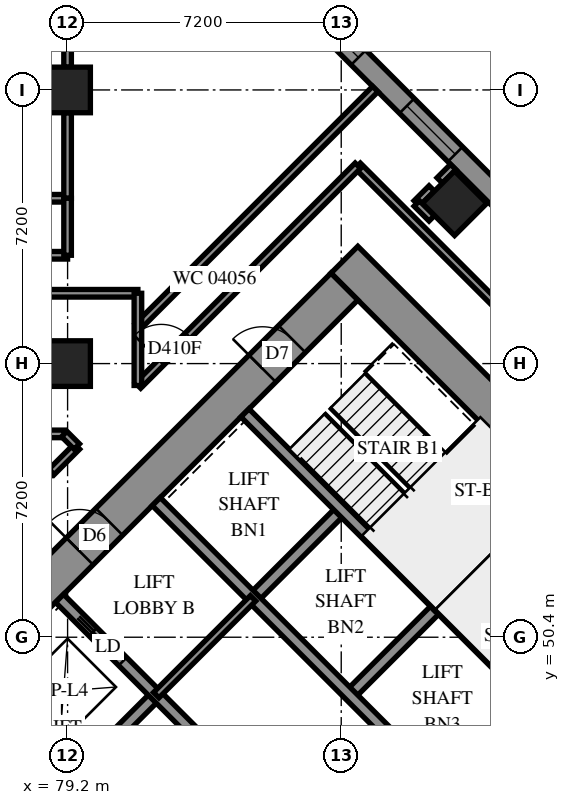
"""IFC4 building model, lengths in metres.
Left out: names, types, materials, properties, quantities, classifications, styles, units other than length and angle.
Written with IfcOpenShell. Run it as: python <this file> out.ifc"""

import sys

from ifc_helpers import new_model, si_unit, direction, frame, frame_2d, origin, origin_2d, place, context, subcontext, project, spatial, polyline, rectangle, outline, extrude, element, fill, save


model = new_model("IFC4")
c1 = context("Model", 3, precision=1e-05, world=origin(), true_north=direction((0.0, 1.0)))
c2 = subcontext(c1, "Body", "Model", "MODEL_VIEW")
j1 = project(units=[si_unit("LENGTHUNIT", "METRE"), si_unit("PLANEANGLEUNIT", "RADIAN")], contexts=[c1])
p1 = place(None, origin())
s1 = spatial("IfcSite", under=j1, at=p1, CompositionType="ELEMENT")
p2 = place(p1, origin())
s2 = spatial("IfcBuilding", under=s1, at=p2, CompositionType="ELEMENT")
p3 = place(p2, frame((0.0, 0.0, 18.6)))
s3 = spatial("IfcBuildingStorey", under=s2, at=p3, CompositionType="ELEMENT", Elevation=18.6)
for number, where, z_axis, x_axis in (
    (1, (79.2, 57.6, 0.0), (0.0, 0.0, 1.0), (1.0, 0.0, 0.0)),
    (2, (79.2, 64.8, 0.0), (0.0, 0.0, 1.0), (1.0, 0.0, 0.0)),
    (3, (89.382, 61.818, 0.0), (0.0, 0.0, 1.0), (0.707, -0.707, 0.0)),
):
    element("IfcColumn", number, at=place(p3, frame(where, z_axis=z_axis, x_axis=x_axis)), inside=s3, PredefinedType="COLUMN", context=c2, shape_type="SweptSolid", body=[
        extrude(rectangle(XDim=1.2, YDim=1.2, at=origin_2d()), origin(), (0.0, 0.0, 1.0), 3.8),
    ])
p4 = place(p3, frame((75.594, 49.443, -0.4), z_axis=(0.0, 0.0, 1.0), x_axis=(0.7071037324, -0.70710983, 0.0)))
e4 = element("IfcWall", 4, at=p4, inside=s3, PredefinedType="SHEAR", context=c2, shape_type="SweptSolid", body=[
    extrude(rectangle(XDim=16.4, YDim=1.0, at=frame_2d((8.2, 0.0))), origin(), (0.0, 0.0, 1.0), 3.5),
])
p5 = place(p3, frame((86.483, 60.333, -0.4), z_axis=(0.0, 0.0, 1.0), x_axis=(0.70710983, -0.7071037324, 0.0)))
e5 = element("IfcWall", 5, at=p5, inside=s3, PredefinedType="SHEAR", context=c2, shape_type="SweptSolid", body=[
    extrude(rectangle(XDim=16.4, YDim=1.0, at=frame_2d((8.2, 0.0))), origin(), (0.0, 0.0, 1.0), 3.5),
])
p6 = place(p5, frame((11.0, 0.0, 0.4)))
e6 = element("IfcOpeningElement", 6, at=p6, cuts=e5, PredefinedType="OPENING", context=c2, shape_type="SweptSolid", body=[
    extrude(rectangle(XDim=0.8, YDim=2.1, at=frame_2d((0.4, 1.05))), frame((0.0, 0.51, 0.0), z_axis=(0.0, -1.0, 0.0), x_axis=(1.0, 0.0, 0.0)), (0.0, 0.0, 1.0), 1.02),
])
p7 = place(p3, frame((76.301, 49.443, -0.4), z_axis=(0.0, 0.0, 1.0), x_axis=(0.7071067812, 0.7071067812, 0.0)))
e7 = element("IfcWall", 7, at=p7, inside=s3, PredefinedType="SHEAR", context=c2, shape_type="SweptSolid", body=[
    extrude(rectangle(XDim=14.4, YDim=1.0, at=frame_2d((7.2, 0.0))), origin(), (0.0, 0.0, 1.0), 3.5),
])
p8 = place(p7, frame((4.55, 0.0, 0.4)))
e8 = element("IfcOpeningElement", 8, at=p8, cuts=e7, PredefinedType="OPENING", context=c2, shape_type="SweptSolid", body=[
    extrude(rectangle(XDim=1.1, YDim=2.1, at=frame_2d((0.55, 1.05))), frame((0.0, 0.51, 0.0), z_axis=(0.0, -1.0, 0.0), x_axis=(1.0, 0.0, 0.0)), (0.0, 0.0, 1.0), 1.02),
])
p9 = place(p7, frame((11.35, 0.0, 0.4)))
e9 = element("IfcOpeningElement", 9, at=p9, cuts=e7, PredefinedType="OPENING", context=c2, shape_type="SweptSolid", body=[
    extrude(rectangle(XDim=1.1, YDim=2.1, at=frame_2d((0.55, 1.05))), frame((0.0, 0.51, 0.0), z_axis=(0.0, -1.0, 0.0), x_axis=(1.0, 0.0, 0.0)), (0.0, 0.0, 1.0), 1.02),
])
p10 = place(p3, frame((87.19, 38.554, -0.4), z_axis=(0.0, 0.0, 1.0), x_axis=(0.707103309, 0.7071102534, 0.0)))
e10 = element("IfcWall", 10, at=p10, inside=s3, PredefinedType="SHEAR", context=c2, shape_type="SweptSolid", body=[
    extrude(rectangle(XDim=14.4, YDim=1.0, at=frame_2d((7.2, 0.0))), origin(), (0.0, 0.0, 1.0), 3.5),
])
p11 = place(p10, frame((4.55, 0.0, 0.4)))
e11 = element("IfcOpeningElement", 11, at=p11, cuts=e10, PredefinedType="OPENING", context=c2, shape_type="SweptSolid", body=[
    extrude(rectangle(XDim=1.1, YDim=2.1, at=frame_2d((0.55, 1.05))), frame((0.0, 0.51, 0.0), z_axis=(0.0, -1.0, 0.0), x_axis=(1.0, 0.0, 0.0)), (0.0, 0.0, 1.0), 1.02),
])
p12 = place(p10, frame((11.35, 0.0, 0.4)))
e12 = element("IfcOpeningElement", 12, at=p12, cuts=e10, PredefinedType="OPENING", context=c2, shape_type="SweptSolid", body=[
    extrude(rectangle(XDim=1.1, YDim=2.1, at=frame_2d((0.55, 1.05))), frame((0.0, 0.51, 0.0), z_axis=(0.0, -1.0, 0.0), x_axis=(1.0, 0.0, 0.0)), (0.0, 0.0, 1.0), 1.02),
])
for number, where, z_axis, x_axis in (
    (13, (79.2, 46.544, 0.0), (0.0, 0.0, 1.0), (0.707, 0.707, 0.0)),
    (14, (84.079, 51.423, 0.0), (0.0, 0.0, 1.0), (0.707, 0.707, 0.0)),
):
    element("IfcWall", number, at=place(p3, frame(where, z_axis=z_axis, x_axis=x_axis)), inside=s3, PredefinedType="SOLIDWALL", context=c2, shape_type="SweptSolid", body=[
        extrude(rectangle(XDim=3.3, YDim=0.3, at=frame_2d((1.65, 0.0))), origin(), (0.0, 0.0, 1.0), 3.8),
    ])
for number, where, z_axis, x_axis in (
    (15, (86.625, 48.878, 0.0), (0.0, 0.0, 1.0), (0.707, 0.707, 0.0)),
    (16, (89.17, 46.332, 0.0), (0.0, 0.0, 1.0), (0.707, 0.707, 0.0)),
):
    element("IfcWall", number, at=place(p3, frame(where, z_axis=z_axis, x_axis=x_axis)), inside=s3, PredefinedType="SOLIDWALL", context=c2, shape_type="SweptSolid", body=[
        extrude(rectangle(XDim=3.3, YDim=0.3, at=frame_2d((1.65, 0.0))), origin(), (0.0, 0.0, 1.0), 3.8),
    ])
p13 = place(p3, frame((78.988, 51.423, 0.0), z_axis=(0.0, 0.0, 1.0), x_axis=(0.7071067812, -0.7071067812, 0.0)))
e17 = element("IfcWall", 17, at=p13, inside=s3, PredefinedType="SOLIDWALL", context=c2, shape_type="SweptSolid", body=[
    extrude(rectangle(XDim=14.4, YDim=0.3, at=frame_2d((7.2, 0.0))), origin(), (0.0, 0.0, 1.0), 3.8),
])
p14 = place(p13, frame((1.25, 0.0, 0.0)))
e18 = element("IfcOpeningElement", 18, at=p14, cuts=e17, PredefinedType="OPENING", context=c2, shape_type="SweptSolid", body=[
    extrude(rectangle(XDim=1.1, YDim=2.1, at=frame_2d((0.55, 1.05))), frame((0.0, 0.16, 0.0), z_axis=(0.0, -1.0, 0.0), x_axis=(1.0, 0.0, 0.0)), (0.0, 0.0, 1.0), 0.32),
])
p15 = place(p13, frame((4.85, 0.0, 0.0)))
e19 = element("IfcOpeningElement", 19, at=p15, cuts=e17, PredefinedType="OPENING", context=c2, shape_type="SweptSolid", body=[
    extrude(rectangle(XDim=1.1, YDim=2.1, at=frame_2d((0.55, 1.05))), frame((0.0, 0.16, 0.0), z_axis=(0.0, -1.0, 0.0), x_axis=(1.0, 0.0, 0.0)), (0.0, 0.0, 1.0), 0.32),
])
p16 = place(p13, frame((8.45, 0.0, 0.0)))
e20 = element("IfcOpeningElement", 20, at=p16, cuts=e17, PredefinedType="OPENING", context=c2, shape_type="SweptSolid", body=[
    extrude(rectangle(XDim=1.1, YDim=2.1, at=frame_2d((0.55, 1.05))), frame((0.0, 0.16, 0.0), z_axis=(0.0, -1.0, 0.0), x_axis=(1.0, 0.0, 0.0)), (0.0, 0.0, 1.0), 0.32),
])
p17 = place(p13, frame((12.05, 0.0, 0.0)))
e21 = element("IfcOpeningElement", 21, at=p17, cuts=e17, PredefinedType="OPENING", context=c2, shape_type="SweptSolid", body=[
    extrude(rectangle(XDim=1.1, YDim=2.1, at=frame_2d((0.55, 1.05))), frame((0.0, 0.16, 0.0), z_axis=(0.0, -1.0, 0.0), x_axis=(1.0, 0.0, 0.0)), (0.0, 0.0, 1.0), 0.32),
])
p18 = place(p3, frame((81.534, 53.969, 0.0), z_axis=(0.0, 0.0, 1.0), x_axis=(0.707103309, -0.7071102534, 0.0)))
e22 = element("IfcWall", 22, at=p18, inside=s3, PredefinedType="SOLIDWALL", context=c2, shape_type="SweptSolid", body=[
    extrude(rectangle(XDim=14.4, YDim=0.3, at=frame_2d((7.2, 0.0))), origin(), (0.0, 0.0, 1.0), 3.8),
])
p19 = place(p18, frame((12.05, 0.0, 0.0)))
e23 = element("IfcOpeningElement", 23, at=p19, cuts=e22, PredefinedType="OPENING", context=c2, shape_type="SweptSolid", body=[
    extrude(rectangle(XDim=1.1, YDim=2.1, at=frame_2d((0.55, 1.05))), frame((0.0, 0.16, 0.0), z_axis=(0.0, -1.0, 0.0), x_axis=(1.0, 0.0, 0.0)), (0.0, 0.0, 1.0), 0.32),
])
for number, where, z_axis, x_axis in (
    (24, (83.867, 56.302, 0.0), (0.0, 0.0, 1.0), (0.707, -0.707, 0.0)),
    (25, (88.958, 51.211, 0.0), (0.0, 0.0, 1.0), (0.707, -0.707, 0.0)),
):
    element("IfcWall", number, at=place(p3, frame(where, z_axis=z_axis, x_axis=x_axis)), inside=s3, PredefinedType="SOLIDWALL", context=c2, shape_type="SweptSolid", body=[
        extrude(rectangle(XDim=7.2, YDim=0.3, at=frame_2d((3.6, 0.0))), origin(), (0.0, 0.0, 1.0), 3.8),
    ])
p20 = place(p3, frame((88.958, 51.211, 0.0), z_axis=(0.0, 0.0, 1.0), x_axis=(0.7071067812, 0.7071067812, 0.0)))
e26 = element("IfcWall", 26, at=p20, inside=s3, PredefinedType="SOLIDWALL", context=c2, shape_type="SweptSolid", body=[
    extrude(rectangle(XDim=4.2, YDim=0.3, at=frame_2d((2.1, 0.0))), origin(), (0.0, 0.0, 1.0), 3.8),
])
p21 = place(p3, frame((117.843, 34.665, 0.0), z_axis=(0.0, 0.0, 1.0), x_axis=(-0.7071067812, 0.7071067812, 0.0)))
e27 = element("IfcWall", 27, at=p21, inside=s3, PredefinedType="SOLIDWALL", context=c2, shape_type="SweptSolid", body=[
    extrude(outline(polyline([(-0.275, -0.275), (54.222, -0.275), (53.994, 0.275), (0.275, 0.275), (-0.275, -0.275)])), origin(), (0.0, 0.0, 1.0), 3.8),
])
p22 = place(p21, frame((0.8, 0.0, 0.7)))
e28 = element("IfcOpeningElement", 28, at=p22, cuts=e27, PredefinedType="OPENING", context=c2, shape_type="SweptSolid", body=[
    extrude(rectangle(XDim=1.8, YDim=2.4, at=frame_2d((0.9, 1.2))), frame((0.0, 0.285, 0.0), z_axis=(0.0, -1.0, 0.0), x_axis=(1.0, 0.0, 0.0)), (0.0, 0.0, 1.0), 0.57),
])
p23 = place(p21, frame((4.225, 0.0, 0.7)))
e29 = element("IfcOpeningElement", 29, at=p23, cuts=e27, PredefinedType="OPENING", context=c2, shape_type="SweptSolid", body=[
    extrude(rectangle(XDim=1.8, YDim=2.4, at=frame_2d((0.9, 1.2))), frame((0.0, 0.285, 0.0), z_axis=(0.0, -1.0, 0.0), x_axis=(1.0, 0.0, 0.0)), (0.0, 0.0, 1.0), 0.57),
])
p24 = place(p21, frame((7.825, 0.0, 0.7)))
e30 = element("IfcOpeningElement", 30, at=p24, cuts=e27, PredefinedType="OPENING", context=c2, shape_type="SweptSolid", body=[
    extrude(rectangle(XDim=1.8, YDim=2.4, at=frame_2d((0.9, 1.2))), frame((0.0, 0.285, 0.0), z_axis=(0.0, -1.0, 0.0), x_axis=(1.0, 0.0, 0.0)), (0.0, 0.0, 1.0), 0.57),
])
p25 = place(p21, frame((11.425, 0.0, 0.7)))
e31 = element("IfcOpeningElement", 31, at=p25, cuts=e27, PredefinedType="OPENING", context=c2, shape_type="SweptSolid", body=[
    extrude(rectangle(XDim=1.8, YDim=2.4, at=frame_2d((0.9, 1.2))), frame((0.0, 0.285, 0.0), z_axis=(0.0, -1.0, 0.0), x_axis=(1.0, 0.0, 0.0)), (0.0, 0.0, 1.0), 0.57),
])
p26 = place(p21, frame((15.025, 0.0, 0.7)))
e32 = element("IfcOpeningElement", 32, at=p26, cuts=e27, PredefinedType="OPENING", context=c2, shape_type="SweptSolid", body=[
    extrude(rectangle(XDim=1.8, YDim=2.4, at=frame_2d((0.9, 1.2))), frame((0.0, 0.285, 0.0), z_axis=(0.0, -1.0, 0.0), x_axis=(1.0, 0.0, 0.0)), (0.0, 0.0, 1.0), 0.57),
])
p27 = place(p21, frame((18.625, 0.0, 0.7)))
e33 = element("IfcOpeningElement", 33, at=p27, cuts=e27, PredefinedType="OPENING", context=c2, shape_type="SweptSolid", body=[
    extrude(rectangle(XDim=1.8, YDim=2.4, at=frame_2d((0.9, 1.2))), frame((0.0, 0.285, 0.0), z_axis=(0.0, -1.0, 0.0), x_axis=(1.0, 0.0, 0.0)), (0.0, 0.0, 1.0), 0.57),
])
p28 = place(p21, frame((22.225, 0.0, 0.7)))
e34 = element("IfcOpeningElement", 34, at=p28, cuts=e27, PredefinedType="OPENING", context=c2, shape_type="SweptSolid", body=[
    extrude(rectangle(XDim=1.8, YDim=2.4, at=frame_2d((0.9, 1.2))), frame((0.0, 0.285, 0.0), z_axis=(0.0, -1.0, 0.0), x_axis=(1.0, 0.0, 0.0)), (0.0, 0.0, 1.0), 0.57),
])
p29 = place(p21, frame((25.825, 0.0, 0.7)))
e35 = element("IfcOpeningElement", 35, at=p29, cuts=e27, PredefinedType="OPENING", context=c2, shape_type="SweptSolid", body=[
    extrude(rectangle(XDim=1.8, YDim=2.4, at=frame_2d((0.9, 1.2))), frame((0.0, 0.285, 0.0), z_axis=(0.0, -1.0, 0.0), x_axis=(1.0, 0.0, 0.0)), (0.0, 0.0, 1.0), 0.57),
])
p30 = place(p21, frame((29.425, 0.0, 0.7)))
e36 = element("IfcOpeningElement", 36, at=p30, cuts=e27, PredefinedType="OPENING", context=c2, shape_type="SweptSolid", body=[
    extrude(rectangle(XDim=1.8, YDim=2.4, at=frame_2d((0.9, 1.2))), frame((0.0, 0.285, 0.0), z_axis=(0.0, -1.0, 0.0), x_axis=(1.0, 0.0, 0.0)), (0.0, 0.0, 1.0), 0.57),
])
p31 = place(p21, frame((33.025, 0.0, 0.7)))
e37 = element("IfcOpeningElement", 37, at=p31, cuts=e27, PredefinedType="OPENING", context=c2, shape_type="SweptSolid", body=[
    extrude(rectangle(XDim=1.8, YDim=2.4, at=frame_2d((0.9, 1.2))), frame((0.0, 0.285, 0.0), z_axis=(0.0, -1.0, 0.0), x_axis=(1.0, 0.0, 0.0)), (0.0, 0.0, 1.0), 0.57),
])
p32 = place(p21, frame((36.625, 0.0, 0.7)))
e38 = element("IfcOpeningElement", 38, at=p32, cuts=e27, PredefinedType="OPENING", context=c2, shape_type="SweptSolid", body=[
    extrude(rectangle(XDim=1.8, YDim=2.4, at=frame_2d((0.9, 1.2))), frame((0.0, 0.285, 0.0), z_axis=(0.0, -1.0, 0.0), x_axis=(1.0, 0.0, 0.0)), (0.0, 0.0, 1.0), 0.57),
])
p33 = place(p21, frame((40.225, 0.0, 0.7)))
e39 = element("IfcOpeningElement", 39, at=p33, cuts=e27, PredefinedType="OPENING", context=c2, shape_type="SweptSolid", body=[
    extrude(rectangle(XDim=1.8, YDim=2.4, at=frame_2d((0.9, 1.2))), frame((0.0, 0.285, 0.0), z_axis=(0.0, -1.0, 0.0), x_axis=(1.0, 0.0, 0.0)), (0.0, 0.0, 1.0), 0.57),
])
p34 = place(p21, frame((43.825, 0.0, 0.7)))
e40 = element("IfcOpeningElement", 40, at=p34, cuts=e27, PredefinedType="OPENING", context=c2, shape_type="SweptSolid", body=[
    extrude(rectangle(XDim=1.8, YDim=2.4, at=frame_2d((0.9, 1.2))), frame((0.0, 0.285, 0.0), z_axis=(0.0, -1.0, 0.0), x_axis=(1.0, 0.0, 0.0)), (0.0, 0.0, 1.0), 0.57),
])
p35 = place(p21, frame((47.425, 0.0, 0.7)))
e41 = element("IfcOpeningElement", 41, at=p35, cuts=e27, PredefinedType="OPENING", context=c2, shape_type="SweptSolid", body=[
    extrude(rectangle(XDim=1.8, YDim=2.4, at=frame_2d((0.9, 1.2))), frame((0.0, 0.285, 0.0), z_axis=(0.0, -1.0, 0.0), x_axis=(1.0, 0.0, 0.0)), (0.0, 0.0, 1.0), 0.57),
])
p36 = place(p21, frame((51.06, 0.0, 0.7)))
e42 = element("IfcOpeningElement", 42, at=p36, cuts=e27, PredefinedType="OPENING", context=c2, shape_type="SweptSolid", body=[
    extrude(rectangle(XDim=1.8, YDim=2.4, at=frame_2d((0.9, 1.2))), frame((0.0, 0.285, 0.0), z_axis=(0.0, -1.0, 0.0), x_axis=(1.0, 0.0, 0.0)), (0.0, 0.0, 1.0), 0.57),
])
p37 = place(p3, frame((81.534, 48.878, 0.0), z_axis=(0.0, 0.0, 1.0), x_axis=(0.707092892, 0.7071206701, 0.0)))
e43 = element("IfcWall", 43, at=p37, inside=s3, PredefinedType="PARTITIONING", context=c2, shape_type="SweptSolid", body=[
    extrude(rectangle(XDim=3.6, YDim=0.2, at=frame_2d((1.8, 0.0))), origin(), (0.0, 0.0, 1.0), 3.8),
])
p38 = place(p3, frame((86.833, 62.805, 0.0), z_axis=(0.0, 0.0, 1.0), x_axis=(0.7072045138, -0.7070090351, 0.0)))
e44 = element("IfcWall", 44, at=p38, inside=s3, PredefinedType="PARTITIONING", context=c2, shape_type="SweptSolid", body=[
    extrude(rectangle(XDim=13.301, YDim=0.2, at=frame_2d((6.65, 0.0))), origin(), (0.0, 0.0, 1.0), 3.8),
])
p39 = place(p38, frame((10.586, 0.0, 0.0)))
e45 = element("IfcOpeningElement", 45, at=p39, cuts=e44, PredefinedType="OPENING", context=c2, shape_type="SweptSolid", body=[
    extrude(rectangle(XDim=1.0, YDim=2.1, at=frame_2d((0.5, 1.05))), frame((0.0, 0.11, 0.0), z_axis=(0.0, -1.0, 0.0), x_axis=(1.0, 0.0, 0.0)), (0.0, 0.0, 1.0), 0.22),
])
p40 = place(p3, frame((81.049, 58.577, 0.0), z_axis=(0.0, 0.0, 1.0), x_axis=(0.7071124411, 0.7071011213, 0.0)))
e46 = element("IfcWall", 46, at=p40, inside=s3, PredefinedType="PARTITIONING", context=c2, shape_type="SweptSolid", body=[
    extrude(rectangle(XDim=8.834, YDim=0.2, at=frame_2d((4.417, 0.0))), origin(), (0.0, 0.0, 1.0), 3.8),
])
p41 = place(p3, frame((81.053, 57.021, 0.0), z_axis=(0.0, 0.0, 1.0), x_axis=(0.7069845395, 0.7072290017, 0.0)))
e47 = element("IfcWall", 47, at=p41, inside=s3, PredefinedType="PARTITIONING", context=c2, shape_type="SweptSolid", body=[
    extrude(rectangle(XDim=8.181, YDim=0.2, at=frame_2d((4.091, 0.0))), origin(), (0.0, 0.0, 1.0), 3.8),
])
p42 = place(p41, frame((0.863, 0.0, 0.0)))
e48 = element("IfcOpeningElement", 48, at=p42, cuts=e47, PredefinedType="OPENING", context=c2, shape_type="SweptSolid", body=[
    extrude(rectangle(XDim=1.0, YDim=2.1, at=frame_2d((0.5, 1.05))), frame((0.0, 0.11, 0.0), z_axis=(0.0, -1.0, 0.0), x_axis=(1.0, 0.0, 0.0)), (0.0, 0.0, 1.0), 0.22),
])
p43 = place(p3, frame((79.2, 65.4, 0.0), z_axis=(0.0, 0.0, 1.0), x_axis=(0.0, 1.0, 0.0)))
e49 = element("IfcWall", 49, at=p43, inside=s3, PredefinedType="PARTITIONING", context=c2, shape_type="SweptSolid", body=[
    extrude(rectangle(XDim=6.0, YDim=0.2, at=frame_2d((3.0, 0.0))), origin(), (0.0, 0.0, 1.0), 3.8),
])
p44 = place(p3, frame((75.038, 61.95, 0.0), z_axis=(0.0, 0.0, 1.0), x_axis=(1.0, 0.0, 0.0)))
e50 = element("IfcWall", 50, at=p44, inside=s3, PredefinedType="PARTITIONING", context=c2, shape_type="SweptSolid", body=[
    extrude(rectangle(XDim=4.162, YDim=0.2, at=frame_2d((2.081, 0.0))), origin(), (0.0, 0.0, 1.0), 3.8),
])
p45 = place(p44, frame((1.129, 0.0, 0.0)))
e51 = element("IfcOpeningElement", 51, at=p45, cuts=e50, PredefinedType="OPENING", context=c2, shape_type="SweptSolid", body=[
    extrude(rectangle(XDim=1.0, YDim=2.1, at=frame_2d((0.5, 1.05))), frame((0.0, 0.11, 0.0), z_axis=(0.0, -1.0, 0.0), x_axis=(1.0, 0.0, 0.0)), (0.0, 0.0, 1.0), 0.22),
])
p46 = place(p3, frame((77.538, 59.45, 0.0), z_axis=(0.0, 0.0, 1.0), x_axis=(1.0, 0.0, 0.0)))
e52 = element("IfcWall", 52, at=p46, inside=s3, PredefinedType="PARTITIONING", context=c2, shape_type="SweptSolid", body=[
    extrude(rectangle(XDim=3.512, YDim=0.2, at=frame_2d((1.756, 0.0))), origin(), (0.0, 0.0, 1.0), 3.8),
])
p47 = place(p3, frame((76.54, 60.45, 0.0), z_axis=(0.0, 0.0, 1.0), x_axis=(1.0, 0.0, 0.0)))
e53 = element("IfcWall", 53, at=p47, inside=s3, PredefinedType="PARTITIONING", context=c2, shape_type="SweptSolid", body=[
    extrude(rectangle(XDim=2.66, YDim=0.2, at=frame_2d((1.33, 0.0))), origin(), (0.0, 0.0, 1.0), 3.8),
])
p48 = place(p3, frame((81.05, 57.024, 0.0), z_axis=(0.0, 0.0, 1.0), x_axis=(0.0, 1.0, 0.0)))
e54 = element("IfcWall", 54, at=p48, inside=s3, PredefinedType="PARTITIONING", context=c2, shape_type="SweptSolid", body=[
    extrude(rectangle(XDim=2.426, YDim=0.2, at=frame_2d((1.213, 0.0))), origin(), (0.0, 0.0, 1.0), 3.8),
])
p49 = place(p3, frame((79.2, 61.95, 0.0), z_axis=(0.0, 0.0, 1.0), x_axis=(0.0, 1.0, 0.0)))
e55 = element("IfcWall", 55, at=p49, inside=s3, PredefinedType="PARTITIONING", context=c2, shape_type="SweptSolid", body=[
    extrude(rectangle(XDim=2.25, YDim=0.2, at=frame_2d((1.125, 0.0))), origin(), (0.0, 0.0, 1.0), 3.8),
])
p50 = place(p3, frame((77.352, 55.75, 0.0), z_axis=(0.0, 0.0, 1.0), x_axis=(1.0, 0.0, 0.0)))
e56 = element("IfcWall", 56, at=p50, inside=s3, PredefinedType="PARTITIONING", context=c2, shape_type="SweptSolid", body=[
    extrude(rectangle(XDim=1.764, YDim=0.2, at=frame_2d((0.882, 0.0))), origin(), (0.0, 0.0, 1.0), 3.8),
])
p51 = place(p3, frame((79.2, 60.45, 0.0), z_axis=(0.0, 0.0, 1.0), x_axis=(0.0, 1.0, 0.0)))
e57 = element("IfcWall", 57, at=p51, inside=s3, PredefinedType="PARTITIONING", context=c2, shape_type="SweptSolid", body=[
    extrude(rectangle(XDim=1.5, YDim=0.2, at=frame_2d((0.75, 0.0))), origin(), (0.0, 0.0, 1.0), 3.8),
])
p52 = place(p3, frame((78.779, 54.751, 0.0), z_axis=(0.0, 0.0, 1.0), x_axis=(0.7071067812, 0.7071067812, 0.0)))
e58 = element("IfcWall", 58, at=p52, inside=s3, PredefinedType="PARTITIONING", context=c2, shape_type="SweptSolid", body=[
    extrude(rectangle(XDim=0.945, YDim=0.2, at=frame_2d((0.472, 0.0))), origin(), (0.0, 0.0, 1.0), 3.8),
])
p53 = place(p3, frame((88.388, 61.815, 0.0), z_axis=(0.0, 0.0, 1.0), x_axis=(0.7071067812, 0.7071067812, 0.0)))
e59 = element("IfcWall", 59, at=p53, inside=s3, PredefinedType="PARTITIONING", context=c2, shape_type="SweptSolid", body=[
    extrude(rectangle(XDim=0.557, YDim=0.2, at=frame_2d((0.279, 0.0))), origin(), (0.0, 0.0, 1.0), 3.8),
])
p54 = place(p3, frame((88.388, 61.813, 0.0), z_axis=(0.0, 0.0, 1.0), x_axis=(0.7089037401, -0.705305244, 0.0)))
e60 = element("IfcWall", 60, at=p54, inside=s3, PredefinedType="PARTITIONING", context=c2, shape_type="SweptSolid", body=[
    extrude(rectangle(XDim=0.556, YDim=0.2, at=frame_2d((0.278, 0.0))), origin(), (0.0, 0.0, 1.0), 3.8),
])
p55 = place(p3, frame((79.113, 55.747, 0.0), z_axis=(0.0, 0.0, 1.0), x_axis=(0.7071067812, -0.7071067812, 0.0)))
e61 = element("IfcWall", 61, at=p55, inside=s3, PredefinedType="PARTITIONING", context=c2, shape_type="SweptSolid", body=[
    extrude(rectangle(XDim=0.467, YDim=0.2, at=frame_2d((0.233, 0.0))), origin(), (0.0, 0.0, 1.0), 3.8),
])
p56 = place(p3, frame((88.992, 62.419, 0.0), z_axis=(0.0, 0.0, 1.0), x_axis=(0.7072064649, 0.7070070834, 0.0)))
e62 = element("IfcWall", 62, at=p56, inside=s3, PredefinedType="PARTITIONING", context=c2, shape_type="SweptSolid", body=[
    extrude(rectangle(XDim=0.502, YDim=0.2, at=frame_2d((0.251, 0.0))), origin(), (0.0, 0.0, 1.0), 3.8),
])
p57 = place(p33, origin())
e63 = element("IfcWindow", 63, at=p57, inside=s3, PartitioningType="SINGLE_PANEL", PredefinedType="WINDOW", context=c2, shape_type="SweptSolid", body=[
    extrude(rectangle(XDim=1.8, YDim=2.4, at=frame_2d((0.9, 1.2))), frame((0.0, 0.155, 0.0), z_axis=(0.0, -1.0, 0.0), x_axis=(1.0, 0.0, 0.0)), (0.0, 0.0, 1.0), 0.06),
])
fill(e39, e63)
p58 = place(p34, origin())
e64 = element("IfcWindow", 64, at=p58, inside=s3, PartitioningType="SINGLE_PANEL", PredefinedType="WINDOW", context=c2, shape_type="SweptSolid", body=[
    extrude(rectangle(XDim=1.8, YDim=2.4, at=frame_2d((0.9, 1.2))), frame((0.0, 0.155, 0.0), z_axis=(0.0, -1.0, 0.0), x_axis=(1.0, 0.0, 0.0)), (0.0, 0.0, 1.0), 0.06),
])
fill(e40, e64)
p59 = place(p8, origin())
e65 = element("IfcDoor", 65, at=p59, inside=s3, OperationType="DOUBLE_DOOR_SINGLE_SWING", PredefinedType="DOOR", context=c2, shape_type="SweptSolid", body=[
    extrude(rectangle(XDim=1.1, YDim=2.1, at=frame_2d((0.55, 1.05))), frame((0.0, 0.025, 0.0), z_axis=(0.0, -1.0, 0.0), x_axis=(1.0, 0.0, 0.0)), (0.0, 0.0, 1.0), 0.05),
])
fill(e8, e65)
p60 = place(p9, origin())
e66 = element("IfcDoor", 66, at=p60, inside=s3, OperationType="SINGLE_SWING_LEFT", PredefinedType="DOOR", context=c2, shape_type="SweptSolid", body=[
    extrude(rectangle(XDim=1.1, YDim=2.1, at=frame_2d((0.55, 1.05))), frame((0.0, 0.025, 0.0), z_axis=(0.0, -1.0, 0.0), x_axis=(1.0, 0.0, 0.0)), (0.0, 0.0, 1.0), 0.05),
])
fill(e9, e66)
p61 = place(p14, origin())
e67 = element("IfcDoor", 67, at=p61, inside=s3, OperationType="SLIDING_TO_LEFT", PredefinedType="DOOR", context=c2, shape_type="SweptSolid", body=[
    extrude(rectangle(XDim=1.1, YDim=2.1, at=frame_2d((0.55, 1.05))), frame((0.0, 0.025, 0.0), z_axis=(0.0, -1.0, 0.0), x_axis=(1.0, 0.0, 0.0)), (0.0, 0.0, 1.0), 0.05),
])
fill(e18, e67)
p62 = place(p42, origin())
e68 = element("IfcDoor", 68, at=p62, inside=s3, OperationType="SINGLE_SWING_RIGHT", PredefinedType="DOOR", context=c2, shape_type="SweptSolid", body=[
    extrude(rectangle(XDim=1.0, YDim=2.1, at=frame_2d((0.5, 1.05))), frame((0.0, 0.025, 0.0), z_axis=(0.0, -1.0, 0.0), x_axis=(1.0, 0.0, 0.0)), (0.0, 0.0, 1.0), 0.05),
])
fill(e48, e68)
save(model, sys.argv[1])
